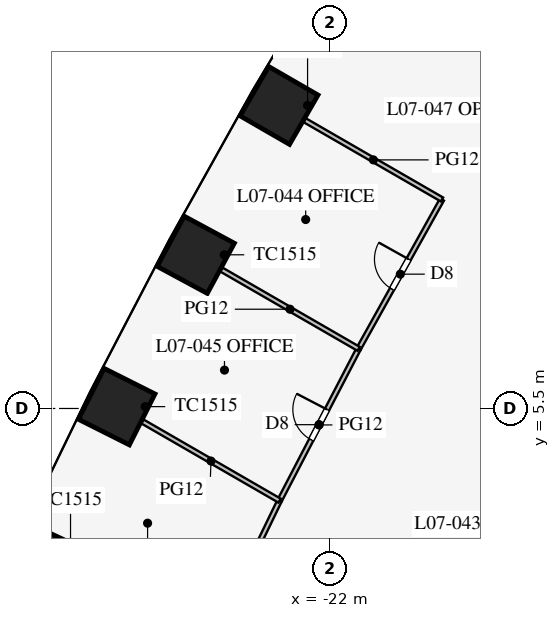
"""IFC4 building model, lengths in metres.
Left out: names, types, materials, properties, quantities, classifications, styles, units other than length and angle.
Written with IfcOpenShell. Run it as: python <this file> out.ifc"""

import sys

from ifc_helpers import new_model, si_unit, direction, frame, frame_2d, origin, origin_2d, place, context, subcontext, project, spatial, rectangle, extrude, element, fill, save


model = new_model("IFC4")
c1 = context("Model", 3, precision=1e-05, world=origin(), true_north=direction((0.0, 1.0)))
c2 = subcontext(c1, "Body", "Model", "MODEL_VIEW")
j1 = project(units=[si_unit("LENGTHUNIT", "METRE"), si_unit("PLANEANGLEUNIT", "RADIAN")], contexts=[c1])
p1 = place(None, origin())
s1 = spatial("IfcSite", under=j1, at=p1, CompositionType="ELEMENT")
p2 = place(p1, origin())
s2 = spatial("IfcBuilding", under=s1, at=p2, CompositionType="ELEMENT")
p3 = place(p2, frame((0.0, 0.0, 33.3)))
s3 = spatial("IfcBuildingStorey", under=s2, at=p3, CompositionType="ELEMENT", Elevation=33.3)
for number, where, z_axis, x_axis in (
    (1, (-23.338, 13.474, 0.0), (0.0, 0.0, 1.0), (-0.5, -0.866, 0.0)),
    (2, (-25.531, 9.544, 0.0), (0.0, 0.0, 1.0), (-0.475, -0.88, 0.0)),
    (3, (-27.611, 5.549, 0.0), (0.0, 0.0, 1.0), (-0.449, -0.894, 0.0)),
    (4, (-29.576, 1.487, 0.0), (0.0, 0.0, 1.0), (-0.423, -0.906, 0.0)),
):
    element("IfcColumn", number, at=place(p3, frame(where, z_axis=z_axis, x_axis=x_axis)), inside=s3, PredefinedType="COLUMN", context=c2, shape_type="SweptSolid", body=[
        extrude(rectangle(XDim=1.5, YDim=1.5, at=origin_2d()), origin(), (0.0, 0.0, 1.0), 4.2),
    ])
p4 = place(p3, frame((-19.052, 10.999, 0.0), z_axis=(0.0, 0.0, 1.0), x_axis=(-0.487373854787, -0.873193406795, 0.0)))
e5 = element("IfcWall", 5, at=p4, inside=s3, PredefinedType="PARTITIONING", context=c2, shape_type="SweptSolid", body=[
    extrude(rectangle(XDim=4.5, YDim=0.12, at=frame_2d((2.25, 0.0))), origin(), (0.0, 0.0, 1.0), 2.9),
])
p5 = place(p4, frame((1.8, 0.0, 0.15)))
e6 = element("IfcOpeningElement", 6, at=p5, cuts=e5, PredefinedType="OPENING", context=c2, shape_type="SweptSolid", body=[
    extrude(rectangle(XDim=0.9, YDim=2.1, at=frame_2d((0.45, 1.05))), frame((0.0, 0.07, 0.0), z_axis=(0.0, -1.0, 0.0), x_axis=(1.0, 0.0, 0.0)), (0.0, 0.0, 1.0), 0.14),
])
p6 = place(p3, frame((-21.245, 7.07, 0.0), z_axis=(0.0, 0.0, 1.0), x_axis=(-0.461852697957, -0.886956642339, 0.0)))
e7 = element("IfcWall", 7, at=p6, inside=s3, PredefinedType="PARTITIONING", context=c2, shape_type="SweptSolid", body=[
    extrude(rectangle(XDim=4.504, YDim=0.12, at=frame_2d((2.252, 0.0))), origin(), (0.0, 0.0, 1.0), 2.9),
])
p7 = place(p6, frame((1.8, 0.0, 0.15)))
e8 = element("IfcOpeningElement", 8, at=p7, cuts=e7, PredefinedType="OPENING", context=c2, shape_type="SweptSolid", body=[
    extrude(rectangle(XDim=0.9, YDim=2.1, at=frame_2d((0.45, 1.05))), frame((0.0, 0.07, 0.0), z_axis=(0.0, -1.0, 0.0), x_axis=(1.0, 0.0, 0.0)), (0.0, 0.0, 1.0), 0.14),
])
p8 = place(p3, frame((-23.325, 3.074, 0.0), z_axis=(0.0, 0.0, 1.0), x_axis=(-0.435857917556, -0.900015486369, 0.0)))
e9 = element("IfcWall", 9, at=p8, inside=s3, PredefinedType="PARTITIONING", context=c2, shape_type="SweptSolid", body=[
    extrude(rectangle(XDim=4.512, YDim=0.12, at=frame_2d((2.256, 0.0))), origin(), (0.0, 0.0, 1.0), 2.9),
])
p9 = place(p8, frame((1.75, 0.0, 0.15)))
e10 = element("IfcOpeningElement", 10, at=p9, cuts=e9, PredefinedType="OPENING", context=c2, shape_type="SweptSolid", body=[
    extrude(rectangle(XDim=1.0, YDim=2.1, at=frame_2d((0.5, 1.05))), frame((0.0, 0.07, 0.0), z_axis=(0.0, -1.0, 0.0), x_axis=(1.0, 0.0, 0.0)), (0.0, 0.0, 1.0), 0.14),
])
p10 = place(p3, frame((-19.052, 10.999, 0.0), z_axis=(0.0, 0.0, 1.0), x_axis=(-0.866004239599, 0.500036655653, 0.0)))
e11 = element("IfcWall", 11, at=p10, inside=s3, PredefinedType="PARTITIONING", context=c2, shape_type="SweptSolid", body=[
    extrude(rectangle(XDim=4.17, YDim=0.12, at=frame_2d((2.085, 0.0))), origin(), (0.0, 0.0, 1.0), 2.9),
])
p11 = place(p3, frame((-21.245, 7.07, 0.0), z_axis=(0.0, 0.0, 1.0), x_axis=(-0.866025669538, 0.499999539701, 0.0)))
e12 = element("IfcWall", 12, at=p11, inside=s3, PredefinedType="PARTITIONING", context=c2, shape_type="SweptSolid", body=[
    extrude(rectangle(XDim=4.169, YDim=0.12, at=frame_2d((2.085, 0.0))), origin(), (0.0, 0.0, 1.0), 2.9),
])
p12 = place(p3, frame((-23.325, 3.074, 0.0), z_axis=(0.0, 0.0, 1.0), x_axis=(-0.866009971343, 0.50002672882, 0.0)))
e13 = element("IfcWall", 13, at=p12, inside=s3, PredefinedType="PARTITIONING", context=c2, shape_type="SweptSolid", body=[
    extrude(rectangle(XDim=4.167, YDim=0.12, at=frame_2d((2.083, 0.0))), origin(), (0.0, 0.0, 1.0), 2.9),
])
p13 = place(p5, frame((0.9, 0.0, 0.0), z_axis=(0.0, 0.0, 1.0), x_axis=(-1.0, 0.0, 0.0)))
e14 = element("IfcDoor", 14, at=p13, inside=s3, OperationType="SINGLE_SWING_RIGHT", PredefinedType="DOOR", context=c2, shape_type="SweptSolid", body=[
    extrude(rectangle(XDim=0.9, YDim=2.1, at=frame_2d((0.45, 1.05))), frame((0.0, 0.025, 0.0), z_axis=(0.0, -1.0, 0.0), x_axis=(1.0, 0.0, 0.0)), (0.0, 0.0, 1.0), 0.05),
])
fill(e6, e14)
p14 = place(p7, frame((0.9, 0.0, 0.0), z_axis=(0.0, 0.0, 1.0), x_axis=(-1.0, 0.0, 0.0)))
e15 = element("IfcDoor", 15, at=p14, inside=s3, OperationType="SINGLE_SWING_RIGHT", PredefinedType="DOOR", context=c2, shape_type="SweptSolid", body=[
    extrude(rectangle(XDim=0.9, YDim=2.1, at=frame_2d((0.45, 1.05))), frame((0.0, 0.025, 0.0), z_axis=(0.0, -1.0, 0.0), x_axis=(1.0, 0.0, 0.0)), (0.0, 0.0, 1.0), 0.05),
])
fill(e8, e15)
save(model, sys.argv[1])
